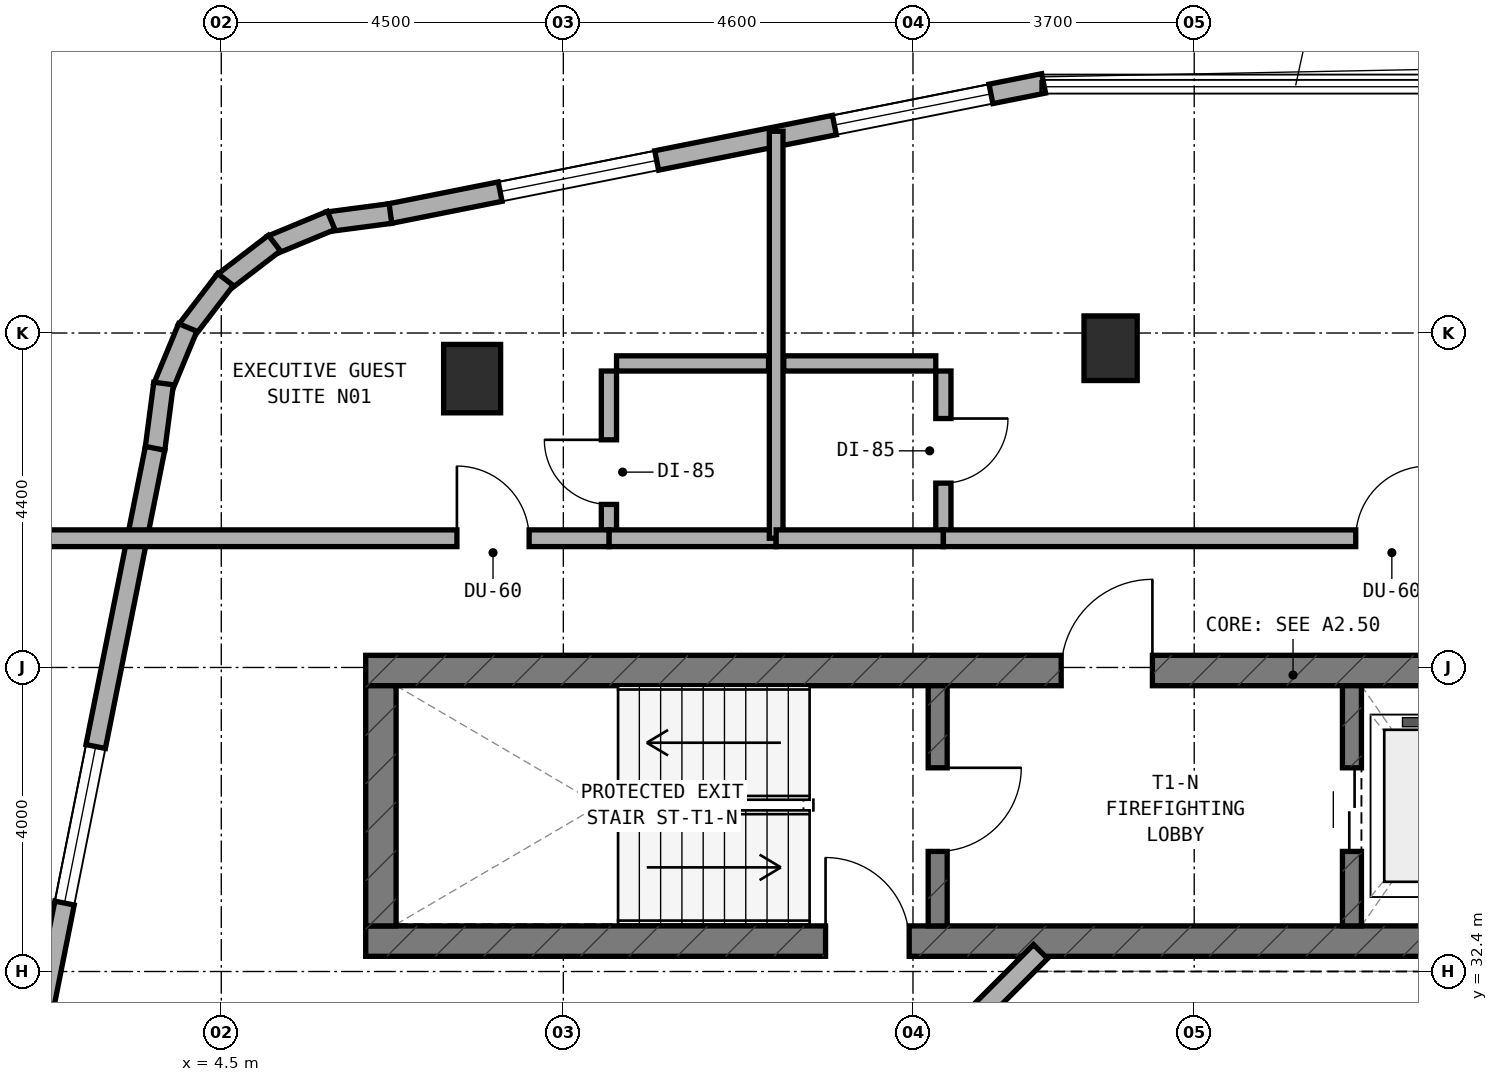
"""IFC4 building model, lengths in metres.
Left out: names, types, materials, properties, quantities, classifications, styles, units other than length and angle.
Written with IfcOpenShell. Run it as: python <this file> out.ifc"""

import sys

from ifc_helpers import new_model, si_unit, direction, frame, frame_2d, origin, origin_2d, place, context, subcontext, project, spatial, rectangle, extrude, element, fill, save


model = new_model("IFC4")
c1 = context("Model", 3, precision=1e-05, world=origin(), true_north=direction((0.0, 1.0)))
c2 = subcontext(c1, "Body", "Model", "MODEL_VIEW")
j1 = project(units=[si_unit("LENGTHUNIT", "METRE"), si_unit("PLANEANGLEUNIT", "RADIAN")], contexts=[c1])
p1 = place(None, origin())
s1 = spatial("IfcSite", under=j1, at=p1, CompositionType="ELEMENT")
p2 = place(p1, origin())
s2 = spatial("IfcBuilding", under=s1, at=p2, CompositionType="ELEMENT")
p3 = place(p2, frame((0.0, 0.0, 235.1)))
s3 = spatial("IfcBuildingStorey", under=s2, at=p3, CompositionType="ELEMENT", Elevation=235.1)
p4 = place(p3, frame((6.4, 32.8, 0.0), z_axis=(0.0, 0.0, 1.0), x_axis=(1.0, 0.0, 0.0)))
e1 = element("IfcWall", 1, at=p4, inside=s3, PredefinedType="SHEAR", context=c2, shape_type="SweptSolid", body=[
    extrude(rectangle(XDim=24.4, YDim=0.4, at=frame_2d((12.2, 0.0))), origin(), (0.0, 0.0, 1.0), 3.6),
])
p5 = place(p4, frame((6.05, 0.0, 0.0)))
e2 = element("IfcOpeningElement", 2, at=p5, cuts=e1, PredefinedType="OPENING", context=c2, shape_type="SweptSolid", body=[
    extrude(rectangle(XDim=1.1, YDim=2.15, at=frame_2d((0.55, 1.075))), frame((0.0, 0.21, 0.0), z_axis=(0.0, -1.0, 0.0), x_axis=(1.0, 0.0, 0.0)), (0.0, 0.0, 1.0), 0.42),
])
p6 = place(p3, frame((6.4, 36.36, 0.0), z_axis=(0.0, 0.0, 1.0), x_axis=(1.0, 0.0, 0.0)))
e3 = element("IfcWall", 3, at=p6, inside=s3, PredefinedType="SHEAR", context=c2, shape_type="SweptSolid", body=[
    extrude(rectangle(XDim=24.4, YDim=0.4, at=frame_2d((12.2, 0.0))), origin(), (0.0, 0.0, 1.0), 3.6),
])
p7 = place(p6, frame((9.15, 0.0, 0.0)))
e4 = element("IfcOpeningElement", 4, at=p7, cuts=e3, PredefinedType="OPENING", context=c2, shape_type="SweptSolid", body=[
    extrude(rectangle(XDim=1.2, YDim=2.15, at=frame_2d((0.6, 1.075))), frame((0.0, 0.21, 0.0), z_axis=(0.0, -1.0, 0.0), x_axis=(1.0, 0.0, 0.0)), (0.0, 0.0, 1.0), 0.42),
])
p8 = place(p6, frame((19.2, 0.0, 0.0)))
e5 = element("IfcOpeningElement", 5, at=p8, cuts=e3, PredefinedType="OPENING", context=c2, shape_type="SweptSolid", body=[
    extrude(rectangle(XDim=0.85, YDim=2.1, at=frame_2d((0.425, 1.05))), frame((0.0, 0.21, 0.0), z_axis=(0.0, -1.0, 0.0), x_axis=(1.0, 0.0, 0.0)), (0.0, 0.0, 1.0), 0.42),
])
p9 = place(p6, frame((16.94, 0.0, 0.0)))
e6 = element("IfcOpeningElement", 6, at=p9, cuts=e3, PredefinedType="OPENING", context=c2, shape_type="SweptSolid", body=[
    extrude(rectangle(XDim=0.85, YDim=2.1, at=frame_2d((0.425, 1.05))), frame((0.0, 0.21, 0.0), z_axis=(0.0, -1.0, 0.0), x_axis=(1.0, 0.0, 0.0)), (0.0, 0.0, 1.0), 0.42),
])
p10 = place(p3, frame((6.6, 33.0, 0.0), z_axis=(0.0, 0.0, 1.0), x_axis=(0.0, 1.0, 0.0)))
e7 = element("IfcWall", 7, at=p10, inside=s3, PredefinedType="SHEAR", context=c2, shape_type="SweptSolid", body=[
    extrude(rectangle(XDim=3.16, YDim=0.4, at=frame_2d((1.58, 0.0))), origin(), (0.0, 0.0, 1.0), 3.6),
])
p11 = place(p3, frame((13.925, 33.0, 0.0), z_axis=(0.0, 0.0, 1.0), x_axis=(0.0, 1.0, 0.0)))
e8 = element("IfcWall", 8, at=p11, inside=s3, PredefinedType="STANDARD", context=c2, shape_type="SweptSolid", body=[
    extrude(rectangle(XDim=3.16, YDim=0.25, at=frame_2d((1.58, 0.0))), origin(), (0.0, 0.0, 1.0), 3.28),
])
p12 = place(p11, frame((0.98, 0.0, 0.0)))
e9 = element("IfcOpeningElement", 9, at=p12, cuts=e8, PredefinedType="OPENING", context=c2, shape_type="SweptSolid", body=[
    extrude(rectangle(XDim=1.1, YDim=2.15, at=frame_2d((0.55, 1.075))), frame((0.0, 0.135, 0.0), z_axis=(0.0, -1.0, 0.0), x_axis=(1.0, 0.0, 0.0)), (0.0, 0.0, 1.0), 0.27),
])
p13 = place(p3, frame((19.375, 33.0, 0.0), z_axis=(0.0, 0.0, 1.0), x_axis=(0.0, 1.0, 0.0)))
e10 = element("IfcWall", 10, at=p13, inside=s3, PredefinedType="STANDARD", context=c2, shape_type="SweptSolid", body=[
    extrude(rectangle(XDim=3.16, YDim=0.25, at=frame_2d((1.58, 0.0))), origin(), (0.0, 0.0, 1.0), 3.28),
])
p14 = place(p13, frame((0.98, 0.0, 0.0)))
e11 = element("IfcOpeningElement", 11, at=p14, cuts=e10, PredefinedType="OPENING", context=c2, shape_type="SweptSolid", body=[
    extrude(rectangle(XDim=1.1, YDim=2.15, at=frame_2d((0.55, 1.075))), frame((0.0, 0.135, 0.0), z_axis=(0.0, -1.0, 0.0), x_axis=(1.0, 0.0, 0.0)), (0.0, 0.0, 1.0), 0.27),
])
p15 = place(p3, frame((16.2, 40.6, 0.0), z_axis=(0.0, 0.0, 1.0), x_axis=(1.0, 0.0, 0.0)))
e12 = element("IfcColumn", 12, at=p15, inside=s3, PredefinedType="COLUMN", context=c2, shape_type="SweptSolid", body=[
    extrude(rectangle(XDim=0.7, YDim=0.85, at=origin_2d()), origin(), (0.0, 0.0, 1.0), 3.6),
])
p16 = place(p3, frame((7.8, 40.2, 0.0), z_axis=(0.0, 0.0, 1.0), x_axis=(1.0, 0.0, 0.0)))
e13 = element("IfcColumn", 13, at=p16, inside=s3, PredefinedType="COLUMN", context=c2, shape_type="SweptSolid", body=[
    extrude(rectangle(XDim=0.75, YDim=0.9, at=origin_2d()), origin(), (0.0, 0.0, 1.0), 3.6),
])
p17 = place(p3, frame((15.319, 44.084, 0.0), z_axis=(0.0, 0.0, 1.0), x_axis=(-0.980745199176, -0.195291715883, 0.0)))
e14 = element("IfcWall", 14, at=p17, inside=s3, PredefinedType="STANDARD", context=c2, shape_type="SweptSolid", body=[
    extrude(rectangle(XDim=8.771, YDim=0.26, at=frame_2d((4.385, 0.0))), origin(), (0.0, 0.0, 1.0), 3.28),
])
p18 = place(p17, frame((0.707, 0.0, 0.85)))
e15 = element("IfcOpeningElement", 15, at=p18, cuts=e14, PredefinedType="OPENING", context=c2, shape_type="SweptSolid", body=[
    extrude(rectangle(XDim=2.1, YDim=1.5, at=frame_2d((1.05, 0.75))), frame((0.0, 0.14, 0.0), z_axis=(0.0, -1.0, 0.0), x_axis=(1.0, 0.0, 0.0)), (0.0, 0.0, 1.0), 0.28),
])
p19 = place(p17, frame((5.191, 0.0, 0.85)))
e16 = element("IfcOpeningElement", 16, at=p19, cuts=e14, PredefinedType="OPENING", context=c2, shape_type="SweptSolid", body=[
    extrude(rectangle(XDim=2.1, YDim=1.5, at=frame_2d((1.05, 0.75))), frame((0.0, 0.14, 0.0), z_axis=(0.0, -1.0, 0.0), x_axis=(1.0, 0.0, 0.0)), (0.0, 0.0, 1.0), 0.28),
])
p20 = place(p3, frame((6.725, 42.372, 0.0), z_axis=(0.0, 0.0, 1.0), x_axis=(-0.9913883573, -0.130954667764, 0.0)))
e17 = element("IfcWall", 17, at=p20, inside=s3, PredefinedType="STANDARD", context=c2, shape_type="SweptSolid", body=[
    extrude(rectangle(XDim=0.833, YDim=0.26, at=frame_2d((0.417, 0.0))), origin(), (0.0, 0.0, 1.0), 3.28),
])
p21 = place(p3, frame((5.945, 42.281, 0.0), z_axis=(0.0, 0.0, 1.0), x_axis=(-0.923754491172, -0.382985169477, 0.0)))
e18 = element("IfcWall", 18, at=p21, inside=s3, PredefinedType="STANDARD", context=c2, shape_type="SweptSolid", body=[
    extrude(rectangle(XDim=0.851, YDim=0.26, at=frame_2d((0.426, 0.0))), origin(), (0.0, 0.0, 1.0), 3.28),
])
for number, where, z_axis, x_axis in (
    (19, (5.199, 41.983, 0.0), (0.0, 0.0, 1.0), (-0.794, -0.608, 0.0)),
    (20, (4.555, 41.504, 0.0), (0.0, 0.0, 1.0), (-0.608, -0.794, 0.0)),
):
    element("IfcWall", number, at=place(p3, frame(where, z_axis=z_axis, x_axis=x_axis)), inside=s3, PredefinedType="STANDARD", context=c2, shape_type="SweptSolid", body=[
        extrude(rectangle(XDim=0.85, YDim=0.26, at=frame_2d((0.425, 0.0))), origin(), (0.0, 0.0, 1.0), 3.28),
    ])
p22 = place(p3, frame((4.059, 40.873, 0.0), z_axis=(0.0, 0.0, 1.0), x_axis=(-0.383229930484, -0.923652976167, 0.0)))
e21 = element("IfcWall", 21, at=p22, inside=s3, PredefinedType="STANDARD", context=c2, shape_type="SweptSolid", body=[
    extrude(rectangle(XDim=0.851, YDim=0.26, at=frame_2d((0.426, 0.0))), origin(), (0.0, 0.0, 1.0), 3.28),
])
p23 = place(p3, frame((3.741, 40.136, 0.0), z_axis=(0.0, 0.0, 1.0), x_axis=(-0.130156359936, -0.991493480548, 0.0)))
e22 = element("IfcWall", 22, at=p23, inside=s3, PredefinedType="STANDARD", context=c2, shape_type="SweptSolid", body=[
    extrude(rectangle(XDim=0.868, YDim=0.26, at=frame_2d((0.434, 0.0))), origin(), (0.0, 0.0, 1.0), 3.28),
])
p24 = place(p3, frame((3.629, 39.283, 0.0), z_axis=(0.0, 0.0, 1.0), x_axis=(-0.195291715883, -0.980745199176, 0.0)))
e23 = element("IfcWall", 23, at=p24, inside=s3, PredefinedType="STANDARD", context=c2, shape_type="SweptSolid", body=[
    extrude(rectangle(XDim=8.771, YDim=0.26, at=frame_2d((4.385, 0.0))), origin(), (0.0, 0.0, 1.0), 3.28),
])
p25 = place(p24, frame((4.0, 0.0, 0.85)))
e24 = element("IfcOpeningElement", 24, at=p25, cuts=e23, PredefinedType="OPENING", context=c2, shape_type="SweptSolid", body=[
    extrude(rectangle(XDim=2.1, YDim=1.5, at=frame_2d((1.05, 0.75))), frame((0.0, 0.14, 0.0), z_axis=(0.0, -1.0, 0.0), x_axis=(1.0, 0.0, 0.0)), (0.0, 0.0, 1.0), 0.28),
])
p26 = place(p3, frame((15.278, 32.662, 0.0), z_axis=(0.0, 0.0, 1.0), x_axis=(-0.707059717605, -0.707153841636, 0.0)))
e25 = element("IfcWall", 25, at=p26, inside=s3, PredefinedType="STANDARD", context=c2, shape_type="SweptSolid", body=[
    extrude(rectangle(XDim=2.594, YDim=0.26, at=frame_2d((1.297, 0.0))), origin(), (0.0, 0.0, 1.0), 3.28),
])
p27 = place(p3, frame((9.6, 38.2, 0.0), z_axis=(0.0, 0.0, 1.0), x_axis=(0.0, 1.0, 0.0)))
e26 = element("IfcWall", 26, at=p27, inside=s3, PredefinedType="PLUMBINGWALL", context=c2, shape_type="SweptSolid", body=[
    extrude(rectangle(XDim=2.1, YDim=0.2, at=frame_2d((1.05, 0.0))), origin(), (0.0, 0.0, 1.0), 2.895),
])
p28 = place(p27, frame((0.345, 0.0, 0.0)))
e27 = element("IfcOpeningElement", 27, at=p28, cuts=e26, PredefinedType="OPENING", context=c2, shape_type="SweptSolid", body=[
    extrude(rectangle(XDim=0.85, YDim=2.1, at=frame_2d((0.425, 1.05))), frame((0.0, 0.11, 0.0), z_axis=(0.0, -1.0, 0.0), x_axis=(1.0, 0.0, 0.0)), (0.0, 0.0, 1.0), 0.22),
])
p29 = place(p3, frame((9.7, 40.4, 0.0), z_axis=(0.0, 0.0, 1.0), x_axis=(1.0, 0.0, 0.0)))
e28 = element("IfcWall", 28, at=p29, inside=s3, PredefinedType="PLUMBINGWALL", context=c2, shape_type="SweptSolid", body=[
    extrude(rectangle(XDim=2.0, YDim=0.2, at=frame_2d((1.0, 0.0))), origin(), (0.0, 0.0, 1.0), 2.975),
])
p30 = place(p3, frame((9.6, 38.1, 0.0), z_axis=(0.0, 0.0, 1.0), x_axis=(1.0, 0.0, 0.0)))
e29 = element("IfcWall", 29, at=p30, inside=s3, PredefinedType="SOLIDWALL", context=c2, shape_type="SweptSolid", body=[
    extrude(rectangle(XDim=2.2, YDim=0.22, at=frame_2d((1.1, 0.0))), origin(), (0.0, 0.0, 1.0), 3.28),
])
p31 = place(p3, frame((1.96, 38.1, 0.0), z_axis=(0.0, 0.0, 1.0), x_axis=(1.0, 0.0, 0.0)))
e30 = element("IfcWall", 30, at=p31, inside=s3, PredefinedType="SOLIDWALL", context=c2, shape_type="SweptSolid", body=[
    extrude(rectangle(XDim=7.64, YDim=0.22, at=frame_2d((3.82, 0.0))), origin(), (0.0, 0.0, 1.0), 2.705),
])
p32 = place(p31, frame((5.64, 0.0, 0.0)))
e31 = element("IfcOpeningElement", 31, at=p32, cuts=e30, PredefinedType="OPENING", context=c2, shape_type="SweptSolid", body=[
    extrude(rectangle(XDim=0.95, YDim=2.1, at=frame_2d((0.475, 1.05))), frame((0.0, 0.12, 0.0), z_axis=(0.0, -1.0, 0.0), x_axis=(1.0, 0.0, 0.0)), (0.0, 0.0, 1.0), 0.24),
])
p33 = place(p3, frame((11.8, 38.1, 0.0), z_axis=(0.0, 0.0, 1.0), x_axis=(0.0, 1.0, 0.0)))
e32 = element("IfcWall", 32, at=p33, inside=s3, PredefinedType="SOLIDWALL", context=c2, shape_type="SweptSolid", body=[
    extrude(rectangle(XDim=5.354, YDim=0.18, at=frame_2d((2.677, 0.0))), origin(), (0.0, 0.0, 1.0), 2.895),
])
p34 = place(p3, frame((14.0, 38.2, 0.0), z_axis=(0.0, 0.0, 1.0), x_axis=(0.0, 1.0, 0.0)))
e33 = element("IfcWall", 33, at=p34, inside=s3, PredefinedType="PLUMBINGWALL", context=c2, shape_type="SweptSolid", body=[
    extrude(rectangle(XDim=2.1, YDim=0.2, at=frame_2d((1.05, 0.0))), origin(), (0.0, 0.0, 1.0), 2.895),
])
p35 = place(p34, frame((0.625, 0.0, 0.0)))
e34 = element("IfcOpeningElement", 34, at=p35, cuts=e33, PredefinedType="OPENING", context=c2, shape_type="SweptSolid", body=[
    extrude(rectangle(XDim=0.85, YDim=2.1, at=frame_2d((0.425, 1.05))), frame((0.0, 0.11, 0.0), z_axis=(0.0, -1.0, 0.0), x_axis=(1.0, 0.0, 0.0)), (0.0, 0.0, 1.0), 0.22),
])
p36 = place(p3, frame((11.9, 40.4, 0.0), z_axis=(0.0, 0.0, 1.0), x_axis=(1.0, 0.0, 0.0)))
e35 = element("IfcWall", 35, at=p36, inside=s3, PredefinedType="PLUMBINGWALL", context=c2, shape_type="SweptSolid", body=[
    extrude(rectangle(XDim=2.0, YDim=0.2, at=frame_2d((1.0, 0.0))), origin(), (0.0, 0.0, 1.0), 2.975),
])
p37 = place(p3, frame((11.8, 38.1, 0.0), z_axis=(0.0, 0.0, 1.0), x_axis=(1.0, 0.0, 0.0)))
e36 = element("IfcWall", 36, at=p37, inside=s3, PredefinedType="SOLIDWALL", context=c2, shape_type="SweptSolid", body=[
    extrude(rectangle(XDim=2.2, YDim=0.22, at=frame_2d((1.1, 0.0))), origin(), (0.0, 0.0, 1.0), 3.28),
])
p38 = place(p3, frame((14.0, 38.1, 0.0), z_axis=(0.0, 0.0, 1.0), x_axis=(1.0, 0.0, 0.0)))
e37 = element("IfcWall", 37, at=p38, inside=s3, PredefinedType="SOLIDWALL", context=c2, shape_type="SweptSolid", body=[
    extrude(rectangle(XDim=11.8, YDim=0.22, at=frame_2d((5.9, 0.0))), origin(), (0.0, 0.0, 1.0), 2.705),
])
p39 = place(p38, frame((5.425, 0.0, 0.0)))
e38 = element("IfcOpeningElement", 38, at=p39, cuts=e37, PredefinedType="OPENING", context=c2, shape_type="SweptSolid", body=[
    extrude(rectangle(XDim=0.95, YDim=2.1, at=frame_2d((0.475, 1.05))), frame((0.0, 0.12, 0.0), z_axis=(0.0, -1.0, 0.0), x_axis=(1.0, 0.0, 0.0)), (0.0, 0.0, 1.0), 0.24),
])
p40 = place(p18, origin())
e39 = element("IfcWindow", 39, at=p40, inside=s3, PartitioningType="SINGLE_PANEL", PredefinedType="WINDOW", context=c2, shape_type="SweptSolid", body=[
    extrude(rectangle(XDim=2.1, YDim=1.5, at=frame_2d((1.05, 0.75))), frame((0.0, 0.03, 0.0), z_axis=(0.0, -1.0, 0.0), x_axis=(1.0, 0.0, 0.0)), (0.0, 0.0, 1.0), 0.06),
])
fill(e15, e39)
p41 = place(p19, origin())
e40 = element("IfcWindow", 40, at=p41, inside=s3, PartitioningType="SINGLE_PANEL", PredefinedType="WINDOW", context=c2, shape_type="SweptSolid", body=[
    extrude(rectangle(XDim=2.1, YDim=1.5, at=frame_2d((1.05, 0.75))), frame((0.0, 0.03, 0.0), z_axis=(0.0, -1.0, 0.0), x_axis=(1.0, 0.0, 0.0)), (0.0, 0.0, 1.0), 0.06),
])
fill(e16, e40)
p42 = place(p25, origin())
e41 = element("IfcWindow", 41, at=p42, inside=s3, PartitioningType="SINGLE_PANEL", PredefinedType="WINDOW", context=c2, shape_type="SweptSolid", body=[
    extrude(rectangle(XDim=2.1, YDim=1.5, at=frame_2d((1.05, 0.75))), frame((0.0, 0.03, 0.0), z_axis=(0.0, -1.0, 0.0), x_axis=(1.0, 0.0, 0.0)), (0.0, 0.0, 1.0), 0.06),
])
fill(e24, e41)
p43 = place(p12, frame((1.1, 0.0, 0.0), z_axis=(0.0, 0.0, 1.0), x_axis=(-1.0, 0.0, 0.0)))
e42 = element("IfcDoor", 42, at=p43, inside=s3, OperationType="SINGLE_SWING_LEFT", PredefinedType="DOOR", context=c2, shape_type="SweptSolid", body=[
    extrude(rectangle(XDim=1.1, YDim=2.15, at=frame_2d((0.55, 1.075))), frame((0.0, 0.025, 0.0), z_axis=(0.0, -1.0, 0.0), x_axis=(1.0, 0.0, 0.0)), (0.0, 0.0, 1.0), 0.05),
])
fill(e9, e42)
p44 = place(p7, origin())
e43 = element("IfcDoor", 43, at=p44, inside=s3, OperationType="SINGLE_SWING_RIGHT", PredefinedType="DOOR", context=c2, shape_type="SweptSolid", body=[
    extrude(rectangle(XDim=1.2, YDim=2.15, at=frame_2d((0.6, 1.075))), frame((0.0, 0.025, 0.0), z_axis=(0.0, -1.0, 0.0), x_axis=(1.0, 0.0, 0.0)), (0.0, 0.0, 1.0), 0.05),
])
fill(e4, e43)
p45 = place(p14, origin())
e44 = element("IfcDoor", 44, at=p45, inside=s3, OperationType="DOUBLE_DOOR_SLIDING", PredefinedType="DOOR", context=c2, shape_type="SweptSolid", body=[
    extrude(rectangle(XDim=1.1, YDim=2.15, at=frame_2d((0.55, 1.075))), frame((0.0, 0.025, 0.0), z_axis=(0.0, -1.0, 0.0), x_axis=(1.0, 0.0, 0.0)), (0.0, 0.0, 1.0), 0.05),
])
fill(e11, e44)
p46 = place(p5, origin())
e45 = element("IfcDoor", 45, at=p46, inside=s3, OperationType="SINGLE_SWING_LEFT", PredefinedType="DOOR", context=c2, shape_type="SweptSolid", body=[
    extrude(rectangle(XDim=1.1, YDim=2.15, at=frame_2d((0.55, 1.075))), frame((0.0, 0.025, 0.0), z_axis=(0.0, -1.0, 0.0), x_axis=(1.0, 0.0, 0.0)), (0.0, 0.0, 1.0), 0.05),
])
fill(e2, e45)
p47 = place(p28, origin())
e46 = element("IfcDoor", 46, at=p47, inside=s3, OperationType="SINGLE_SWING_RIGHT", PredefinedType="DOOR", context=c2, shape_type="SweptSolid", body=[
    extrude(rectangle(XDim=0.85, YDim=2.1, at=frame_2d((0.425, 1.05))), frame((0.0, 0.025, 0.0), z_axis=(0.0, -1.0, 0.0), x_axis=(1.0, 0.0, 0.0)), (0.0, 0.0, 1.0), 0.05),
])
fill(e27, e46)
p48 = place(p32, origin())
e47 = element("IfcDoor", 47, at=p48, inside=s3, OperationType="SINGLE_SWING_LEFT", PredefinedType="DOOR", context=c2, shape_type="SweptSolid", body=[
    extrude(rectangle(XDim=0.95, YDim=2.1, at=frame_2d((0.475, 1.05))), frame((0.0, 0.025, 0.0), z_axis=(0.0, -1.0, 0.0), x_axis=(1.0, 0.0, 0.0)), (0.0, 0.0, 1.0), 0.05),
])
fill(e31, e47)
p49 = place(p35, frame((0.85, 0.0, 0.0), z_axis=(0.0, 0.0, 1.0), x_axis=(-1.0, 0.0, 0.0)))
e48 = element("IfcDoor", 48, at=p49, inside=s3, OperationType="SINGLE_SWING_LEFT", PredefinedType="DOOR", context=c2, shape_type="SweptSolid", body=[
    extrude(rectangle(XDim=0.85, YDim=2.1, at=frame_2d((0.425, 1.05))), frame((0.0, 0.025, 0.0), z_axis=(0.0, -1.0, 0.0), x_axis=(1.0, 0.0, 0.0)), (0.0, 0.0, 1.0), 0.05),
])
fill(e34, e48)
p50 = place(p39, origin())
e49 = element("IfcDoor", 49, at=p50, inside=s3, OperationType="SINGLE_SWING_RIGHT", PredefinedType="DOOR", context=c2, shape_type="SweptSolid", body=[
    extrude(rectangle(XDim=0.95, YDim=2.1, at=frame_2d((0.475, 1.05))), frame((0.0, 0.025, 0.0), z_axis=(0.0, -1.0, 0.0), x_axis=(1.0, 0.0, 0.0)), (0.0, 0.0, 1.0), 0.05),
])
fill(e38, e49)
save(model, sys.argv[1])
